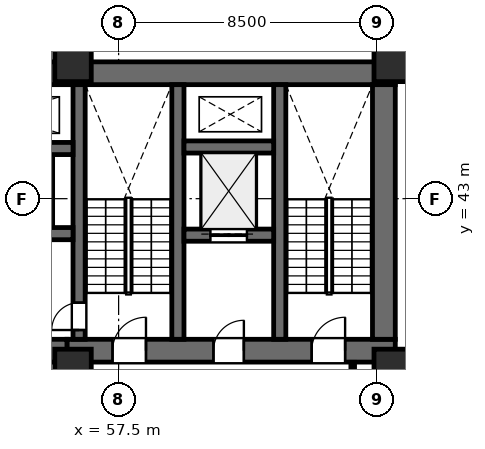
"""IFC4 building model, lengths in metres.
Left out: names, types, materials, properties, quantities, classifications, styles, units other than length and angle.
Written with IfcOpenShell. Run it as: python <this file> out.ifc"""

import sys

from ifc_helpers import new_model, si_unit, direction, frame, frame_2d, origin, origin_2d, place, context, subcontext, project, spatial, rectangle, extrude, element, fill, save


model = new_model("IFC4")
c1 = context("Model", 3, precision=1e-05, world=origin(), true_north=direction((0.0, 1.0)))
c2 = subcontext(c1, "Body", "Model", "MODEL_VIEW")
j1 = project(units=[si_unit("LENGTHUNIT", "METRE"), si_unit("PLANEANGLEUNIT", "RADIAN")], contexts=[c1])
p1 = place(None, origin())
s1 = spatial("IfcSite", under=j1, at=p1, CompositionType="ELEMENT")
p2 = place(p1, origin())
s2 = spatial("IfcBuilding", under=s1, at=p2, CompositionType="ELEMENT")
p3 = place(p2, frame((0.0, 0.0, 69.5)))
s3 = spatial("IfcBuildingStorey", under=s2, at=p3, CompositionType="ELEMENT", Elevation=69.5)
p4 = place(p3, frame((22.9, 47.125, 0.0), z_axis=(0.0, 0.0, 1.0), x_axis=(1.0, 0.0, 0.0)))
e1 = element("IfcWall", 1, at=p4, inside=s3, PredefinedType="SHEAR", context=c2, shape_type="SweptSolid", body=[
    extrude(rectangle(XDim=43.7, YDim=0.75, at=frame_2d((21.85, 0.0))), origin(), (0.0, 0.0, 1.0), 4.0),
])
p5 = place(p3, frame((55.8, 38.0, 0.0), z_axis=(0.0, 0.0, 1.0), x_axis=(1.0, 0.0, 0.0)))
e2 = element("IfcWall", 2, at=p5, inside=s3, PredefinedType="SHEAR", context=c2, shape_type="SweptSolid", body=[
    extrude(rectangle(XDim=10.8, YDim=0.75, at=frame_2d((5.4, 0.0))), origin(), (0.0, 0.0, 1.0), 4.0),
])
p6 = place(p5, frame((1.5, 0.0, 0.0)))
e3 = element("IfcOpeningElement", 3, at=p6, cuts=e2, PredefinedType="OPENING", context=c2, shape_type="SweptSolid", body=[
    extrude(rectangle(XDim=1.1, YDim=2.2, at=frame_2d((0.55, 1.1))), frame((0.0, 0.385, 0.0), z_axis=(0.0, -1.0, 0.0), x_axis=(1.0, 0.0, 0.0)), (0.0, 0.0, 1.0), 0.77),
])
p7 = place(p5, frame((4.82, 0.0, 0.0)))
e4 = element("IfcOpeningElement", 4, at=p7, cuts=e2, PredefinedType="OPENING", context=c2, shape_type="SweptSolid", body=[
    extrude(rectangle(XDim=1.0, YDim=2.15, at=frame_2d((0.5, 1.075))), frame((0.0, 0.385, 0.0), z_axis=(0.0, -1.0, 0.0), x_axis=(1.0, 0.0, 0.0)), (0.0, 0.0, 1.0), 0.77),
])
p8 = place(p5, frame((8.05, 0.0, 0.0)))
e5 = element("IfcOpeningElement", 5, at=p8, cuts=e2, PredefinedType="OPENING", context=c2, shape_type="SweptSolid", body=[
    extrude(rectangle(XDim=1.1, YDim=2.2, at=frame_2d((0.55, 1.1))), frame((0.0, 0.385, 0.0), z_axis=(0.0, -1.0, 0.0), x_axis=(1.0, 0.0, 0.0)), (0.0, 0.0, 1.0), 0.77),
])
p9 = place(p3, frame((66.225, 38.375, 0.0), z_axis=(0.0, 0.0, 1.0), x_axis=(0.0, 1.0, 0.0)))
e6 = element("IfcWall", 6, at=p9, inside=s3, PredefinedType="SHEAR", context=c2, shape_type="SweptSolid", body=[
    extrude(rectangle(XDim=8.375, YDim=0.75, at=frame_2d((4.188, 0.0))), origin(), (0.0, 0.0, 1.0), 4.0),
])
for number, where, z_axis, x_axis in (
    (7, (62.8, 38.375, 0.0), (0.0, 0.0, 1.0), (0.0, 1.0, 0.0)),
    (8, (59.45, 38.375, 0.0), (0.0, 0.0, 1.0), (0.0, 1.0, 0.0)),
):
    element("IfcWall", number, at=place(p3, frame(where, z_axis=z_axis, x_axis=x_axis)), inside=s3, PredefinedType="SHEAR", context=c2, shape_type="SweptSolid", body=[
        extrude(rectangle(XDim=8.375, YDim=0.4, at=frame_2d((4.188, 0.0))), origin(), (0.0, 0.0, 1.0), 4.0),
    ])
p10 = place(p3, frame((56.2, 38.375, 0.0), z_axis=(0.0, 0.0, 1.0), x_axis=(0.0, 1.0, 0.0)))
e9 = element("IfcWall", 9, at=p10, inside=s3, PredefinedType="SHEAR", context=c2, shape_type="SweptSolid", body=[
    extrude(rectangle(XDim=8.375, YDim=0.4, at=frame_2d((4.188, 0.0))), origin(), (0.0, 0.0, 1.0), 4.0),
])
p11 = place(p10, frame((0.305, 0.0, 0.0)))
e10 = element("IfcOpeningElement", 10, at=p11, cuts=e9, PredefinedType="OPENING", context=c2, shape_type="SweptSolid", body=[
    extrude(rectangle(XDim=0.9, YDim=2.15, at=frame_2d((0.45, 1.075))), frame((0.0, 0.21, 0.0), z_axis=(0.0, -1.0, 0.0), x_axis=(1.0, 0.0, 0.0)), (0.0, 0.0, 1.0), 0.42),
])
p12 = place(p3, frame((59.65, 41.8, 0.0), z_axis=(0.0, 0.0, 1.0), x_axis=(1.0, 0.0, 0.0)))
e11 = element("IfcWall", 11, at=p12, inside=s3, PredefinedType="SHEAR", context=c2, shape_type="SweptSolid", body=[
    extrude(rectangle(XDim=2.95, YDim=0.4, at=frame_2d((1.475, 0.0))), origin(), (0.0, 0.0, 1.0), 4.0),
])
p13 = place(p12, frame((0.87, 0.0, 0.0)))
e12 = element("IfcOpeningElement", 12, at=p13, cuts=e11, PredefinedType="OPENING", context=c2, shape_type="SweptSolid", body=[
    extrude(rectangle(XDim=1.2, YDim=2.2, at=frame_2d((0.6, 1.1))), frame((0.0, 0.21, 0.0), z_axis=(0.0, -1.0, 0.0), x_axis=(1.0, 0.0, 0.0)), (0.0, 0.0, 1.0), 0.42),
])
p14 = place(p3, frame((59.65, 44.7, 0.0), z_axis=(0.0, 0.0, 1.0), x_axis=(1.0, 0.0, 0.0)))
e13 = element("IfcWall", 13, at=p14, inside=s3, PredefinedType="SHEAR", context=c2, shape_type="SweptSolid", body=[
    extrude(rectangle(XDim=2.95, YDim=0.4, at=frame_2d((1.475, 0.0))), origin(), (0.0, 0.0, 1.0), 4.0),
])
p15 = place(p3, frame((50.8, 38.0, 0.0), z_axis=(0.0, 0.0, 1.0), x_axis=(1.0, 0.0, 0.0)))
e14 = element("IfcWall", 14, at=p15, inside=s3, PredefinedType="SHEAR", context=c2, shape_type="SweptSolid", body=[
    extrude(rectangle(XDim=5.0, YDim=0.75, at=frame_2d((2.5, 0.0))), origin(), (0.0, 0.0, 1.0), 4.0),
])
p16 = place(p15, frame((2.0, 0.0, 0.0)))
e15 = element("IfcOpeningElement", 15, at=p16, cuts=e14, PredefinedType="OPENING", context=c2, shape_type="SweptSolid", body=[
    extrude(rectangle(XDim=1.2, YDim=2.2, at=frame_2d((0.6, 1.1))), frame((0.0, 0.385, 0.0), z_axis=(0.0, -1.0, 0.0), x_axis=(1.0, 0.0, 0.0)), (0.0, 0.0, 1.0), 0.77),
])
p17 = place(p3, frame((51.25, 41.85, 0.0), z_axis=(0.0, 0.0, 1.0), x_axis=(1.0, 0.0, 0.0)))
e16 = element("IfcWall", 16, at=p17, inside=s3, PredefinedType="SHEAR", context=c2, shape_type="SweptSolid", body=[
    extrude(rectangle(XDim=4.75, YDim=0.4, at=frame_2d((2.375, 0.0))), origin(), (0.0, 0.0, 1.0), 4.0),
])
p18 = place(p17, frame((0.5, 0.0, 0.0)))
e17 = element("IfcOpeningElement", 17, at=p18, cuts=e16, PredefinedType="OPENING", context=c2, shape_type="SweptSolid", body=[
    extrude(rectangle(XDim=1.2, YDim=2.2, at=frame_2d((0.6, 1.1))), frame((0.0, 0.21, 0.0), z_axis=(0.0, -1.0, 0.0), x_axis=(1.0, 0.0, 0.0)), (0.0, 0.0, 1.0), 0.42),
])
p19 = place(p17, frame((2.6, 0.0, 0.0)))
e18 = element("IfcOpeningElement", 18, at=p19, cuts=e16, PredefinedType="OPENING", context=c2, shape_type="SweptSolid", body=[
    extrude(rectangle(XDim=1.2, YDim=2.2, at=frame_2d((0.6, 1.1))), frame((0.0, 0.21, 0.0), z_axis=(0.0, -1.0, 0.0), x_axis=(1.0, 0.0, 0.0)), (0.0, 0.0, 1.0), 0.42),
])
p20 = place(p3, frame((51.25, 44.65, 0.0), z_axis=(0.0, 0.0, 1.0), x_axis=(1.0, 0.0, 0.0)))
e19 = element("IfcWall", 19, at=p20, inside=s3, PredefinedType="SHEAR", context=c2, shape_type="SweptSolid", body=[
    extrude(rectangle(XDim=4.75, YDim=0.4, at=frame_2d((2.375, 0.0))), origin(), (0.0, 0.0, 1.0), 4.0),
])
for number, where, z_axis, x_axis in (
    (20, (66.5, 47.55, 0.0), (0.0, 0.0, 1.0), (1.0, 0.0, 0.0)),
    (21, (56.0, 47.55, 0.0), (0.0, 0.0, 1.0), (1.0, 0.0, 0.0)),
    (22, (66.5, 37.35, 0.0), (0.0, 0.0, 1.0), (1.0, 0.0, 0.0)),
    (23, (56.0, 37.35, 0.0), (0.0, 0.0, 1.0), (1.0, 0.0, 0.0)),
):
    element("IfcColumn", number, at=place(p3, frame(where, z_axis=z_axis, x_axis=x_axis)), inside=s3, PredefinedType="COLUMN", context=c2, shape_type="SweptSolid", body=[
        extrude(rectangle(XDim=1.2, YDim=1.4, at=origin_2d()), origin(), (0.0, 0.0, 1.0), 4.0),
    ])
p21 = place(p3, frame((68.375, 37.8, 0.0), z_axis=(0.0, 0.0, 1.0), x_axis=(-0.139174610616, -0.990267856572, 0.0)))
e24 = element("IfcWall", 24, at=p21, inside=s3, PredefinedType="STANDARD", context=c2, shape_type="SweptSolid", body=[
    extrude(rectangle(XDim=34.6, YDim=0.28, at=frame_2d((17.3, 0.0))), origin(), (0.0, 0.0, 1.0), 3.74),
])
p22 = place(p21, frame((7.872, 0.0, 0.0)))
e25 = element("IfcOpeningElement", 25, at=p22, cuts=e24, PredefinedType="OPENING", context=c2, shape_type="SweptSolid", body=[
    extrude(rectangle(XDim=1.0, YDim=2.15, at=frame_2d((0.5, 1.075))), frame((0.0, 0.15, 0.0), z_axis=(0.0, -1.0, 0.0), x_axis=(1.0, 0.0, 0.0)), (0.0, 0.0, 1.0), 0.3),
])
p23 = place(p21, frame((3.852, 0.0, 0.65)))
e26 = element("IfcOpeningElement", 26, at=p23, cuts=e24, PredefinedType="OPENING", context=c2, shape_type="SweptSolid", body=[
    extrude(rectangle(XDim=1.8, YDim=2.1, at=frame_2d((0.9, 1.05))), frame((0.0, 0.15, 0.0), z_axis=(0.0, -1.0, 0.0), x_axis=(1.0, 0.0, 0.0)), (0.0, 0.0, 1.0), 0.3),
])
p24 = place(p21, frame((20.663, 0.0, 0.65)))
e27 = element("IfcOpeningElement", 27, at=p24, cuts=e24, PredefinedType="OPENING", context=c2, shape_type="SweptSolid", body=[
    extrude(rectangle(XDim=1.8, YDim=2.1, at=frame_2d((0.9, 1.05))), frame((0.0, 0.15, 0.0), z_axis=(0.0, -1.0, 0.0), x_axis=(1.0, 0.0, 0.0)), (0.0, 0.0, 1.0), 0.3),
])
p25 = place(p3, frame((65.2, 34.4, 0.0), z_axis=(0.0, 0.0, 1.0), x_axis=(0.0, 1.0, 0.0)))
e28 = element("IfcWall", 28, at=p25, inside=s3, PredefinedType="PARTITIONING", context=c2, shape_type="SweptSolid", body=[
    extrude(rectangle(XDim=3.217, YDim=0.12, at=frame_2d((1.608, 0.0))), origin(), (0.0, 0.0, 1.0), 2.813),
])
p26 = place(p6, origin())
e29 = element("IfcDoor", 29, at=p26, inside=s3, OperationType="SINGLE_SWING_RIGHT", PredefinedType="DOOR", context=c2, shape_type="SweptSolid", body=[
    extrude(rectangle(XDim=1.1, YDim=2.2, at=frame_2d((0.55, 1.1))), frame((0.0, 0.025, 0.0), z_axis=(0.0, -1.0, 0.0), x_axis=(1.0, 0.0, 0.0)), (0.0, 0.0, 1.0), 0.05),
])
fill(e3, e29)
p27 = place(p7, origin())
e30 = element("IfcDoor", 30, at=p27, inside=s3, OperationType="SINGLE_SWING_RIGHT", PredefinedType="DOOR", context=c2, shape_type="SweptSolid", body=[
    extrude(rectangle(XDim=1.0, YDim=2.15, at=frame_2d((0.5, 1.075))), frame((0.0, 0.025, 0.0), z_axis=(0.0, -1.0, 0.0), x_axis=(1.0, 0.0, 0.0)), (0.0, 0.0, 1.0), 0.05),
])
fill(e4, e30)
p28 = place(p8, origin())
e31 = element("IfcDoor", 31, at=p28, inside=s3, OperationType="SINGLE_SWING_RIGHT", PredefinedType="DOOR", context=c2, shape_type="SweptSolid", body=[
    extrude(rectangle(XDim=1.1, YDim=2.2, at=frame_2d((0.55, 1.1))), frame((0.0, 0.025, 0.0), z_axis=(0.0, -1.0, 0.0), x_axis=(1.0, 0.0, 0.0)), (0.0, 0.0, 1.0), 0.05),
])
fill(e5, e31)
p29 = place(p11, origin())
e32 = element("IfcDoor", 32, at=p29, inside=s3, OperationType="SINGLE_SWING_LEFT", PredefinedType="DOOR", context=c2, shape_type="SweptSolid", body=[
    extrude(rectangle(XDim=0.9, YDim=2.15, at=frame_2d((0.45, 1.075))), frame((0.0, 0.025, 0.0), z_axis=(0.0, -1.0, 0.0), x_axis=(1.0, 0.0, 0.0)), (0.0, 0.0, 1.0), 0.05),
])
fill(e10, e32)
p30 = place(p13, origin())
e33 = element("IfcDoor", 33, at=p30, inside=s3, OperationType="DOUBLE_DOOR_SLIDING", PredefinedType="DOOR", context=c2, shape_type="SweptSolid", body=[
    extrude(rectangle(XDim=1.2, YDim=2.2, at=frame_2d((0.6, 1.1))), frame((0.0, 0.025, 0.0), z_axis=(0.0, -1.0, 0.0), x_axis=(1.0, 0.0, 0.0)), (0.0, 0.0, 1.0), 0.05),
])
fill(e12, e33)
save(model, sys.argv[1])
